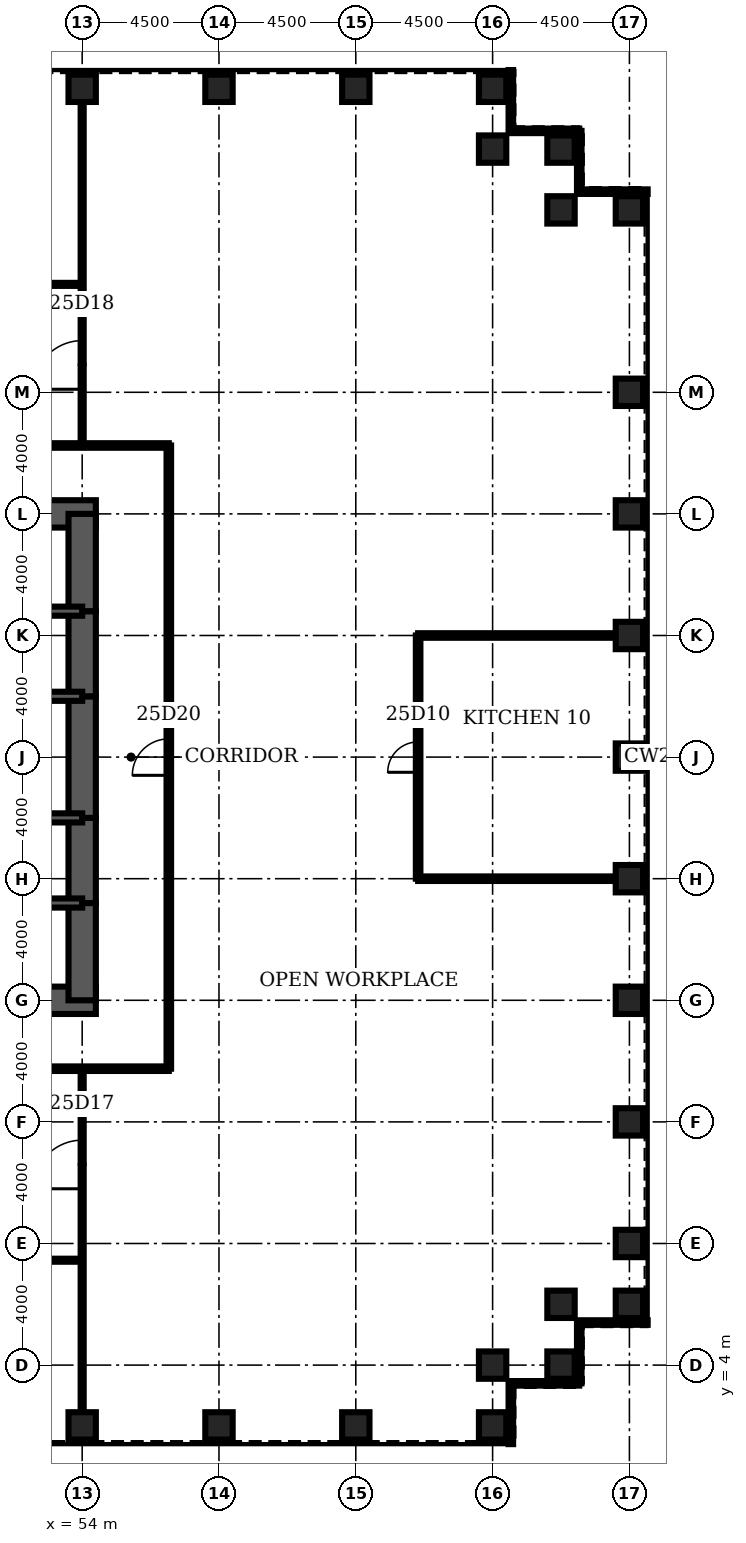
"""IFC4 building model, lengths in metres.
Left out: names, types, materials, properties, quantities, classifications, styles, units other than length and angle.
Written with IfcOpenShell. Run it as: python <this file> out.ifc"""

import sys

from ifc_helpers import new_model, si_unit, direction, frame, frame_2d, origin, origin_2d, place, context, subcontext, project, spatial, rectangle, hollow_rectangle, extrude, element, fill, save


model = new_model("IFC4")
c1 = context("Model", 3, precision=1e-05, world=origin(), true_north=direction((0.0, 1.0)))
c2 = subcontext(c1, "Body", "Model", "MODEL_VIEW")
j1 = project(units=[si_unit("LENGTHUNIT", "METRE"), si_unit("PLANEANGLEUNIT", "RADIAN")], contexts=[c1])
p1 = place(None, origin())
s1 = spatial("IfcSite", under=j1, at=p1, CompositionType="ELEMENT")
p2 = place(p1, origin())
s2 = spatial("IfcBuilding", under=s1, at=p2, CompositionType="ELEMENT")
p3 = place(p2, frame((0.0, 0.0, 117.3)))
s3 = spatial("IfcBuildingStorey", under=s2, at=p3, CompositionType="ELEMENT", Elevation=117.3)
for number, where, z_axis, x_axis in (
    (1, (54.0, 2.0, 0.0), (0.0, 0.0, 1.0), (0.0, 1.0, 0.0)),
    (2, (58.5, 2.0, 0.0), (0.0, 0.0, 1.0), (0.0, 1.0, 0.0)),
    (3, (63.0, 2.0, 0.0), (0.0, 0.0, 1.0), (0.0, 1.0, 0.0)),
    (4, (67.5, 2.0, 0.0), (0.0, 0.0, 1.0), (0.0, 1.0, 0.0)),
    (5, (67.5, 4.0, 0.0), (0.0, 0.0, 1.0), (0.0, 1.0, 0.0)),
    (6, (69.75, 4.0, 0.0), (0.0, 0.0, 1.0), (1.0, 0.0, 0.0)),
    (7, (69.75, 6.0, 0.0), (0.0, 0.0, 1.0), (1.0, 0.0, 0.0)),
    (8, (72.0, 6.0, 0.0), (0.0, 0.0, 1.0), (1.0, 0.0, 0.0)),
    (9, (72.0, 8.0, 0.0), (0.0, 0.0, 1.0), (1.0, 0.0, 0.0)),
    (10, (72.0, 12.0, 0.0), (0.0, 0.0, 1.0), (1.0, 0.0, 0.0)),
    (11, (72.0, 16.0, 0.0), (0.0, 0.0, 1.0), (1.0, 0.0, 0.0)),
    (12, (72.0, 20.0, 0.0), (0.0, 0.0, 1.0), (1.0, 0.0, 0.0)),
    (13, (72.0, 24.0, 0.0), (0.0, 0.0, 1.0), (1.0, 0.0, 0.0)),
    (14, (72.0, 28.0, 0.0), (0.0, 0.0, 1.0), (1.0, 0.0, 0.0)),
    (15, (72.0, 32.0, 0.0), (0.0, 0.0, 1.0), (1.0, 0.0, 0.0)),
    (16, (72.0, 36.0, 0.0), (0.0, 0.0, 1.0), (1.0, 0.0, 0.0)),
    (17, (72.0, 42.0, 0.0), (0.0, 0.0, 1.0), (1.0, 0.0, 0.0)),
    (18, (69.75, 42.0, 0.0), (0.0, 0.0, 1.0), (1.0, 0.0, 0.0)),
    (19, (69.75, 44.0, 0.0), (0.0, 0.0, 1.0), (1.0, 0.0, 0.0)),
    (20, (67.5, 44.0, 0.0), (0.0, 0.0, 1.0), (0.0, 1.0, 0.0)),
    (21, (67.5, 46.0, 0.0), (0.0, 0.0, 1.0), (0.0, 1.0, 0.0)),
    (22, (63.0, 46.0, 0.0), (0.0, 0.0, 1.0), (0.0, 1.0, 0.0)),
    (23, (58.5, 46.0, 0.0), (0.0, 0.0, 1.0), (0.0, 1.0, 0.0)),
    (24, (54.0, 46.0, 0.0), (0.0, 0.0, 1.0), (0.0, 1.0, 0.0)),
):
    element("IfcColumn", number, at=place(p3, frame(where, z_axis=z_axis, x_axis=x_axis)), inside=s3, PredefinedType="COLUMN", context=c2, shape_type="SweptSolid", body=[
        extrude(hollow_rectangle(XDim=0.9, YDim=0.9, WallThickness=0.11, at=origin_2d()), origin(), (0.0, 0.0, 1.0), 4.2),
    ])
for number, where, z_axis, x_axis in (
    (25, (45.0, 16.0, 0.0), (0.0, 0.0, 1.0), (1.0, 0.0, 0.0)),
    (26, (54.45, 32.0, 0.0), (0.0, 0.0, 1.0), (-1.0, 0.0, 0.0)),
):
    element("IfcWall", number, at=place(p3, frame(where, z_axis=z_axis, x_axis=x_axis)), inside=s3, PredefinedType="SHEAR", context=c2, shape_type="SweptSolid", body=[
        extrude(rectangle(XDim=9.45, YDim=0.9, at=frame_2d((4.725, 0.0))), origin(), (0.0, 0.0, 1.0), 4.2),
    ])
p4 = place(p3, frame((54.0, 16.0, 0.0), z_axis=(0.0, 0.0, 1.0), x_axis=(0.0, 1.0, 0.0)))
e27 = element("IfcWall", 27, at=p4, inside=s3, PredefinedType="SHEAR", context=c2, shape_type="SweptSolid", body=[
    extrude(rectangle(XDim=3.2, YDim=0.9, at=frame_2d((1.6, 0.0))), origin(), (0.0, 0.0, 1.0), 4.2),
])
p5 = place(p3, frame((54.0, 19.2, 0.0), z_axis=(0.0, 0.0, 1.0), x_axis=(0.0, 1.0, 0.0)))
e28 = element("IfcWall", 28, at=p5, inside=s3, PredefinedType="SHEAR", context=c2, shape_type="SweptSolid", body=[
    extrude(rectangle(XDim=2.8, YDim=0.9, at=frame_2d((1.4, 0.0))), origin(), (0.0, 0.0, 1.0), 4.2),
])
p6 = place(p5, frame((0.4, 0.0, 0.0)))
e29 = element("IfcOpeningElement", 29, at=p6, cuts=e28, PredefinedType="OPENING", context=c2, shape_type="SweptSolid", body=[
    extrude(rectangle(XDim=1.8, YDim=2.1, at=frame_2d((0.9, 1.05))), frame((0.0, 0.46, 0.0), z_axis=(0.0, -1.0, 0.0), x_axis=(1.0, 0.0, 0.0)), (0.0, 0.0, 1.0), 0.92),
])
p7 = place(p3, frame((54.0, 22.0, 0.0), z_axis=(0.0, 0.0, 1.0), x_axis=(0.0, 1.0, 0.0)))
e30 = element("IfcWall", 30, at=p7, inside=s3, PredefinedType="SHEAR", context=c2, shape_type="SweptSolid", body=[
    extrude(rectangle(XDim=4.0, YDim=0.9, at=frame_2d((2.0, 0.0))), origin(), (0.0, 0.0, 1.0), 4.2),
])
p8 = place(p3, frame((54.0, 26.0, 0.0), z_axis=(0.0, 0.0, 1.0), x_axis=(0.0, 1.0, 0.0)))
e31 = element("IfcWall", 31, at=p8, inside=s3, PredefinedType="SHEAR", context=c2, shape_type="SweptSolid", body=[
    extrude(rectangle(XDim=2.8, YDim=0.9, at=frame_2d((1.4, 0.0))), origin(), (0.0, 0.0, 1.0), 4.2),
])
p9 = place(p8, frame((0.6, 0.0, 0.0)))
e32 = element("IfcOpeningElement", 32, at=p9, cuts=e31, PredefinedType="OPENING", context=c2, shape_type="SweptSolid", body=[
    extrude(rectangle(XDim=1.8, YDim=2.1, at=frame_2d((0.9, 1.05))), frame((0.0, 0.46, 0.0), z_axis=(0.0, -1.0, 0.0), x_axis=(1.0, 0.0, 0.0)), (0.0, 0.0, 1.0), 0.92),
])
p10 = place(p3, frame((54.0, 28.8, 0.0), z_axis=(0.0, 0.0, 1.0), x_axis=(0.0, 1.0, 0.0)))
e33 = element("IfcWall", 33, at=p10, inside=s3, PredefinedType="SHEAR", context=c2, shape_type="SweptSolid", body=[
    extrude(rectangle(XDim=3.2, YDim=0.9, at=frame_2d((1.6, 0.0))), origin(), (0.0, 0.0, 1.0), 4.2),
])
p11 = place(p3, frame((45.0, 19.2, 0.0), z_axis=(0.0, 0.0, 1.0), x_axis=(1.0, 0.0, 0.0)))
e34 = element("IfcWall", 34, at=p11, inside=s3, PredefinedType="SOLIDWALL", context=c2, shape_type="SweptSolid", body=[
    extrude(rectangle(XDim=9.0, YDim=0.3, at=frame_2d((4.5, 0.0))), origin(), (0.0, 0.0, 1.0), 4.2),
])
p12 = place(p11, frame((7.35, 0.0, 0.0)))
e35 = element("IfcOpeningElement", 35, at=p12, cuts=e34, PredefinedType="OPENING", context=c2, shape_type="SweptSolid", body=[
    extrude(rectangle(XDim=1.0, YDim=2.1, at=frame_2d((0.5, 1.05))), frame((0.0, 0.16, 0.0), z_axis=(0.0, -1.0, 0.0), x_axis=(1.0, 0.0, 0.0)), (0.0, 0.0, 1.0), 0.32),
])
p13 = place(p3, frame((45.0, 28.8, 0.0), z_axis=(0.0, 0.0, 1.0), x_axis=(1.0, 0.0, 0.0)))
e36 = element("IfcWall", 36, at=p13, inside=s3, PredefinedType="SOLIDWALL", context=c2, shape_type="SweptSolid", body=[
    extrude(rectangle(XDim=9.0, YDim=0.3, at=frame_2d((4.5, 0.0))), origin(), (0.0, 0.0, 1.0), 4.2),
])
p14 = place(p13, frame((7.35, 0.0, 0.0)))
e37 = element("IfcOpeningElement", 37, at=p14, cuts=e36, PredefinedType="OPENING", context=c2, shape_type="SweptSolid", body=[
    extrude(rectangle(XDim=1.0, YDim=2.1, at=frame_2d((0.5, 1.05))), frame((0.0, 0.16, 0.0), z_axis=(0.0, -1.0, 0.0), x_axis=(1.0, 0.0, 0.0)), (0.0, 0.0, 1.0), 0.32),
])
p15 = place(p3, frame((48.0, 22.0, 0.0), z_axis=(0.0, 0.0, 1.0), x_axis=(1.0, 0.0, 0.0)))
e38 = element("IfcWall", 38, at=p15, inside=s3, PredefinedType="SOLIDWALL", context=c2, shape_type="SweptSolid", body=[
    extrude(rectangle(XDim=6.0, YDim=0.3, at=frame_2d((3.0, 0.0))), origin(), (0.0, 0.0, 1.0), 4.2),
])
p16 = place(p15, frame((2.0, 0.0, 0.0)))
e39 = element("IfcOpeningElement", 39, at=p16, cuts=e38, PredefinedType="OPENING", context=c2, shape_type="SweptSolid", body=[
    extrude(rectangle(XDim=1.0, YDim=2.1, at=frame_2d((0.5, 1.05))), frame((0.0, 0.16, 0.0), z_axis=(0.0, -1.0, 0.0), x_axis=(1.0, 0.0, 0.0)), (0.0, 0.0, 1.0), 0.32),
])
p17 = place(p15, frame((4.0, 0.0, 0.0)))
e40 = element("IfcOpeningElement", 40, at=p17, cuts=e38, PredefinedType="OPENING", context=c2, shape_type="SweptSolid", body=[
    extrude(rectangle(XDim=1.0, YDim=2.1, at=frame_2d((0.5, 1.05))), frame((0.0, 0.16, 0.0), z_axis=(0.0, -1.0, 0.0), x_axis=(1.0, 0.0, 0.0)), (0.0, 0.0, 1.0), 0.32),
])
p18 = place(p3, frame((48.0, 26.0, 0.0), z_axis=(0.0, 0.0, 1.0), x_axis=(1.0, 0.0, 0.0)))
e41 = element("IfcWall", 41, at=p18, inside=s3, PredefinedType="SOLIDWALL", context=c2, shape_type="SweptSolid", body=[
    extrude(rectangle(XDim=6.0, YDim=0.3, at=frame_2d((3.0, 0.0))), origin(), (0.0, 0.0, 1.0), 4.2),
])
p19 = place(p3, frame((36.0, 7.45, 0.0), z_axis=(0.0, 0.0, 1.0), x_axis=(1.0, 0.0, 0.0)))
e42 = element("IfcWall", 42, at=p19, inside=s3, PredefinedType="PARTITIONING", context=c2, shape_type="SweptSolid", body=[
    extrude(rectangle(XDim=18.0, YDim=0.1, at=frame_2d((9.0, 0.0))), origin(), (0.0, 0.0, 1.0), 3.0),
])
p20 = place(p19, frame((4.0, 0.0, 0.0)))
e43 = element("IfcOpeningElement", 43, at=p20, cuts=e42, PredefinedType="OPENING", context=c2, shape_type="SweptSolid", body=[
    extrude(rectangle(XDim=1.0, YDim=2.1, at=frame_2d((0.5, 1.05))), frame((0.0, 0.06, 0.0), z_axis=(0.0, -1.0, 0.0), x_axis=(1.0, 0.0, 0.0)), (0.0, 0.0, 1.0), 0.12),
])
p21 = place(p19, frame((13.0, 0.0, 0.0)))
e44 = element("IfcOpeningElement", 44, at=p21, cuts=e42, PredefinedType="OPENING", context=c2, shape_type="SweptSolid", body=[
    extrude(rectangle(XDim=1.0, YDim=2.1, at=frame_2d((0.5, 1.05))), frame((0.0, 0.06, 0.0), z_axis=(0.0, -1.0, 0.0), x_axis=(1.0, 0.0, 0.0)), (0.0, 0.0, 1.0), 0.12),
])
p22 = place(p3, frame((15.15, 13.75, 0.0), z_axis=(0.0, 0.0, 1.0), x_axis=(1.0, 0.0, 0.0)))
e45 = element("IfcWall", 45, at=p22, inside=s3, PredefinedType="PARTITIONING", context=c2, shape_type="SweptSolid", body=[
    extrude(rectangle(XDim=41.7, YDim=0.15, at=frame_2d((20.85, 0.0))), origin(), (0.0, 0.0, 1.0), 3.0),
])
p23 = place(p22, frame((29.275, 0.0, 0.0)))
e46 = element("IfcOpeningElement", 46, at=p23, cuts=e45, PredefinedType="OPENING", context=c2, shape_type="SweptSolid", body=[
    extrude(rectangle(XDim=1.2, YDim=2.1, at=frame_2d((0.6, 1.05))), frame((0.0, 0.085, 0.0), z_axis=(0.0, -1.0, 0.0), x_axis=(1.0, 0.0, 0.0)), (0.0, 0.0, 1.0), 0.17),
])
for number, where, z_axis, x_axis in (
    (47, (65.05, 20.0, 0.0), (0.0, 0.0, 1.0), (1.0, 0.0, 0.0)),
    (48, (65.05, 28.0, 0.0), (0.0, 0.0, 1.0), (1.0, 0.0, 0.0)),
):
    element("IfcWall", number, at=place(p3, frame(where, z_axis=z_axis, x_axis=x_axis)), inside=s3, PredefinedType="PARTITIONING", context=c2, shape_type="SweptSolid", body=[
        extrude(rectangle(XDim=6.5, YDim=0.15, at=frame_2d((3.25, 0.0))), origin(), (0.0, 0.0, 1.0), 3.0),
    ])
p24 = place(p3, frame((15.15, 34.25, 0.0), z_axis=(0.0, 0.0, 1.0), x_axis=(1.0, 0.0, 0.0)))
e49 = element("IfcWall", 49, at=p24, inside=s3, PredefinedType="PARTITIONING", context=c2, shape_type="SweptSolid", body=[
    extrude(rectangle(XDim=41.7, YDim=0.15, at=frame_2d((20.85, 0.0))), origin(), (0.0, 0.0, 1.0), 3.0),
])
p25 = place(p24, frame((20.25, 0.0, 0.0)))
e50 = element("IfcOpeningElement", 50, at=p25, cuts=e49, PredefinedType="OPENING", context=c2, shape_type="SweptSolid", body=[
    extrude(rectangle(XDim=1.2, YDim=2.1, at=frame_2d((0.6, 1.05))), frame((0.0, 0.085, 0.0), z_axis=(0.0, -1.0, 0.0), x_axis=(1.0, 0.0, 0.0)), (0.0, 0.0, 1.0), 0.17),
])
p26 = place(p3, frame((18.0, 39.55, 0.0), z_axis=(0.0, 0.0, 1.0), x_axis=(1.0, 0.0, 0.0)))
e51 = element("IfcWall", 51, at=p26, inside=s3, PredefinedType="PARTITIONING", context=c2, shape_type="SweptSolid", body=[
    extrude(rectangle(XDim=36.0, YDim=0.1, at=frame_2d((18.0, 0.0))), origin(), (0.0, 0.0, 1.0), 3.0),
])
p27 = place(p26, frame((4.0, 0.0, 0.0)))
e52 = element("IfcOpeningElement", 52, at=p27, cuts=e51, PredefinedType="OPENING", context=c2, shape_type="SweptSolid", body=[
    extrude(rectangle(XDim=1.0, YDim=2.1, at=frame_2d((0.5, 1.05))), frame((0.0, 0.06, 0.0), z_axis=(0.0, -1.0, 0.0), x_axis=(1.0, 0.0, 0.0)), (0.0, 0.0, 1.0), 0.12),
])
p28 = place(p26, frame((13.0, 0.0, 0.0)))
e53 = element("IfcOpeningElement", 53, at=p28, cuts=e51, PredefinedType="OPENING", context=c2, shape_type="SweptSolid", body=[
    extrude(rectangle(XDim=1.0, YDim=2.1, at=frame_2d((0.5, 1.05))), frame((0.0, 0.06, 0.0), z_axis=(0.0, -1.0, 0.0), x_axis=(1.0, 0.0, 0.0)), (0.0, 0.0, 1.0), 0.12),
])
p29 = place(p26, frame((22.0, 0.0, 0.0)))
e54 = element("IfcOpeningElement", 54, at=p29, cuts=e51, PredefinedType="OPENING", context=c2, shape_type="SweptSolid", body=[
    extrude(rectangle(XDim=1.0, YDim=2.1, at=frame_2d((0.5, 1.05))), frame((0.0, 0.06, 0.0), z_axis=(0.0, -1.0, 0.0), x_axis=(1.0, 0.0, 0.0)), (0.0, 0.0, 1.0), 0.12),
])
p30 = place(p26, frame((31.0, 0.0, 0.0)))
e55 = element("IfcOpeningElement", 55, at=p30, cuts=e51, PredefinedType="OPENING", context=c2, shape_type="SweptSolid", body=[
    extrude(rectangle(XDim=1.0, YDim=2.1, at=frame_2d((0.5, 1.05))), frame((0.0, 0.06, 0.0), z_axis=(0.0, -1.0, 0.0), x_axis=(1.0, 0.0, 0.0)), (0.0, 0.0, 1.0), 0.12),
])
p31 = place(p3, frame((54.0, 2.45, 0.0), z_axis=(0.0, 0.0, 1.0), x_axis=(0.0, 1.0, 0.0)))
e56 = element("IfcWall", 56, at=p31, inside=s3, PredefinedType="PARTITIONING", context=c2, shape_type="SweptSolid", body=[
    extrude(rectangle(XDim=11.3, YDim=0.1, at=frame_2d((5.65, 0.0))), origin(), (0.0, 0.0, 1.0), 3.0),
])
p32 = place(p31, frame((7.35, 0.0, 0.0)))
e57 = element("IfcOpeningElement", 57, at=p32, cuts=e56, PredefinedType="OPENING", context=c2, shape_type="SweptSolid", body=[
    extrude(rectangle(XDim=1.6, YDim=2.1, at=frame_2d((0.8, 1.05))), frame((0.0, 0.06, 0.0), z_axis=(0.0, -1.0, 0.0), x_axis=(1.0, 0.0, 0.0)), (0.0, 0.0, 1.0), 0.12),
])
p33 = place(p3, frame((54.0, 34.25, 0.0), z_axis=(0.0, 0.0, 1.0), x_axis=(0.0, 1.0, 0.0)))
e58 = element("IfcWall", 58, at=p33, inside=s3, PredefinedType="PARTITIONING", context=c2, shape_type="SweptSolid", body=[
    extrude(rectangle(XDim=11.3, YDim=0.1, at=frame_2d((5.65, 0.0))), origin(), (0.0, 0.0, 1.0), 3.0),
])
p34 = place(p33, frame((1.85, 0.0, 0.0)))
e59 = element("IfcOpeningElement", 59, at=p34, cuts=e58, PredefinedType="OPENING", context=c2, shape_type="SweptSolid", body=[
    extrude(rectangle(XDim=1.6, YDim=2.1, at=frame_2d((0.8, 1.05))), frame((0.0, 0.06, 0.0), z_axis=(0.0, -1.0, 0.0), x_axis=(1.0, 0.0, 0.0)), (0.0, 0.0, 1.0), 0.12),
])
p35 = place(p3, frame((56.85, 13.75, 0.0), z_axis=(0.0, 0.0, 1.0), x_axis=(0.0, 1.0, 0.0)))
e60 = element("IfcWall", 60, at=p35, inside=s3, PredefinedType="PARTITIONING", context=c2, shape_type="SweptSolid", body=[
    extrude(rectangle(XDim=20.5, YDim=0.15, at=frame_2d((10.25, 0.0))), origin(), (0.0, 0.0, 1.0), 3.0),
])
p36 = place(p35, frame((9.65, 0.0, 0.0)))
e61 = element("IfcOpeningElement", 61, at=p36, cuts=e60, PredefinedType="OPENING", context=c2, shape_type="SweptSolid", body=[
    extrude(rectangle(XDim=1.2, YDim=2.1, at=frame_2d((0.6, 1.05))), frame((0.0, 0.085, 0.0), z_axis=(0.0, -1.0, 0.0), x_axis=(1.0, 0.0, 0.0)), (0.0, 0.0, 1.0), 0.17),
])
p37 = place(p3, frame((65.05, 20.0, 0.0), z_axis=(0.0, 0.0, 1.0), x_axis=(0.0, 1.0, 0.0)))
e62 = element("IfcWall", 62, at=p37, inside=s3, PredefinedType="PARTITIONING", context=c2, shape_type="SweptSolid", body=[
    extrude(rectangle(XDim=8.0, YDim=0.15, at=frame_2d((4.0, 0.0))), origin(), (0.0, 0.0, 1.0), 3.0),
])
p38 = place(p37, frame((3.5, 0.0, 0.0)))
e63 = element("IfcOpeningElement", 63, at=p38, cuts=e62, PredefinedType="OPENING", context=c2, shape_type="SweptSolid", body=[
    extrude(rectangle(XDim=1.0, YDim=2.1, at=frame_2d((0.5, 1.05))), frame((0.0, 0.085, 0.0), z_axis=(0.0, -1.0, 0.0), x_axis=(1.0, 0.0, 0.0)), (0.0, 0.0, 1.0), 0.17),
])
p39 = place(p3, frame((68.1, 1.4, 0.0), z_axis=(0.0, 0.0, 1.0), x_axis=(0.0, 1.0, 0.0)))
e64 = element("IfcWall", 64, at=p39, inside=s3, PredefinedType="ELEMENTEDWALL", context=c2, shape_type="SweptSolid", body=[
    extrude(rectangle(XDim=2.0, YDim=0.15, at=frame_2d((1.0, 0.0))), origin(), (0.0, 0.0, 1.0), 4.04),
])
p40 = place(p3, frame((68.1, 3.4, 0.0), z_axis=(0.0, 0.0, 1.0), x_axis=(1.0, 0.0, 0.0)))
e65 = element("IfcWall", 65, at=p40, inside=s3, PredefinedType="ELEMENTEDWALL", context=c2, shape_type="SweptSolid", body=[
    extrude(rectangle(XDim=2.25, YDim=0.15, at=frame_2d((1.125, 0.0))), origin(), (0.0, 0.0, 1.0), 4.04),
])
p41 = place(p3, frame((70.35, 3.4, 0.0), z_axis=(0.0, 0.0, 1.0), x_axis=(0.0, 1.0, 0.0)))
e66 = element("IfcWall", 66, at=p41, inside=s3, PredefinedType="ELEMENTEDWALL", context=c2, shape_type="SweptSolid", body=[
    extrude(rectangle(XDim=2.0, YDim=0.15, at=frame_2d((1.0, 0.0))), origin(), (0.0, 0.0, 1.0), 4.04),
])
for number, where, z_axis, x_axis in (
    (67, (70.35, 5.4, 0.0), (0.0, 0.0, 1.0), (1.0, 0.0, 0.0)),
    (68, (72.6, 42.6, 0.0), (0.0, 0.0, 1.0), (-1.0, 0.0, 0.0)),
):
    element("IfcWall", number, at=place(p3, frame(where, z_axis=z_axis, x_axis=x_axis)), inside=s3, PredefinedType="ELEMENTEDWALL", context=c2, shape_type="SweptSolid", body=[
        extrude(rectangle(XDim=2.25, YDim=0.15, at=frame_2d((1.125, 0.0))), origin(), (0.0, 0.0, 1.0), 4.04),
    ])
p42 = place(p3, frame((70.35, 42.6, 0.0), z_axis=(0.0, 0.0, 1.0), x_axis=(0.0, 1.0, 0.0)))
e69 = element("IfcWall", 69, at=p42, inside=s3, PredefinedType="ELEMENTEDWALL", context=c2, shape_type="SweptSolid", body=[
    extrude(rectangle(XDim=2.0, YDim=0.15, at=frame_2d((1.0, 0.0))), origin(), (0.0, 0.0, 1.0), 4.04),
])
p43 = place(p3, frame((70.35, 44.6, 0.0), z_axis=(0.0, 0.0, 1.0), x_axis=(-1.0, 0.0, 0.0)))
e70 = element("IfcWall", 70, at=p43, inside=s3, PredefinedType="ELEMENTEDWALL", context=c2, shape_type="SweptSolid", body=[
    extrude(rectangle(XDim=2.25, YDim=0.15, at=frame_2d((1.125, 0.0))), origin(), (0.0, 0.0, 1.0), 4.04),
])
p44 = place(p3, frame((68.1, 44.6, 0.0), z_axis=(0.0, 0.0, 1.0), x_axis=(0.0, 1.0, 0.0)))
e71 = element("IfcWall", 71, at=p44, inside=s3, PredefinedType="ELEMENTEDWALL", context=c2, shape_type="SweptSolid", body=[
    extrude(rectangle(XDim=2.0, YDim=0.15, at=frame_2d((1.0, 0.0))), origin(), (0.0, 0.0, 1.0), 4.04),
])
p45 = place(p38, origin())
e72 = element("IfcDoor", 72, at=p45, inside=s3, OperationType="SINGLE_SWING_LEFT", PredefinedType="DOOR", context=c2, shape_type="SweptSolid", body=[
    extrude(rectangle(XDim=1.0, YDim=2.1, at=frame_2d((0.5, 1.05))), frame((0.0, 0.025, 0.0), z_axis=(0.0, -1.0, 0.0), x_axis=(1.0, 0.0, 0.0)), (0.0, 0.0, 1.0), 0.05),
])
fill(e63, e72)
p46 = place(p32, origin())
e73 = element("IfcDoor", 73, at=p46, inside=s3, OperationType="SINGLE_SWING_LEFT", PredefinedType="DOOR", context=c2, shape_type="SweptSolid", body=[
    extrude(rectangle(XDim=1.6, YDim=2.1, at=frame_2d((0.8, 1.05))), frame((0.0, 0.025, 0.0), z_axis=(0.0, -1.0, 0.0), x_axis=(1.0, 0.0, 0.0)), (0.0, 0.0, 1.0), 0.05),
])
fill(e57, e73)
p47 = place(p34, origin())
e74 = element("IfcDoor", 74, at=p47, inside=s3, OperationType="SINGLE_SWING_LEFT", PredefinedType="DOOR", context=c2, shape_type="SweptSolid", body=[
    extrude(rectangle(XDim=1.6, YDim=2.1, at=frame_2d((0.8, 1.05))), frame((0.0, 0.025, 0.0), z_axis=(0.0, -1.0, 0.0), x_axis=(1.0, 0.0, 0.0)), (0.0, 0.0, 1.0), 0.05),
])
fill(e59, e74)
p48 = place(p36, origin())
e75 = element("IfcDoor", 75, at=p48, inside=s3, OperationType="SINGLE_SWING_LEFT", PredefinedType="DOOR", context=c2, shape_type="SweptSolid", body=[
    extrude(rectangle(XDim=1.2, YDim=2.1, at=frame_2d((0.6, 1.05))), frame((0.0, 0.025, 0.0), z_axis=(0.0, -1.0, 0.0), x_axis=(1.0, 0.0, 0.0)), (0.0, 0.0, 1.0), 0.05),
])
fill(e61, e75)
p49 = place(p12, origin())
e76 = element("IfcDoor", 76, at=p49, inside=s3, OperationType="SINGLE_SWING_RIGHT", PredefinedType="DOOR", context=c2, shape_type="SweptSolid", body=[
    extrude(rectangle(XDim=1.0, YDim=2.1, at=frame_2d((0.5, 1.05))), frame((0.0, 0.025, 0.0), z_axis=(0.0, -1.0, 0.0), x_axis=(1.0, 0.0, 0.0)), (0.0, 0.0, 1.0), 0.05),
])
fill(e35, e76)
p50 = place(p14, origin())
e77 = element("IfcDoor", 77, at=p50, inside=s3, OperationType="SINGLE_SWING_RIGHT", PredefinedType="DOOR", context=c2, shape_type="SweptSolid", body=[
    extrude(rectangle(XDim=1.0, YDim=2.1, at=frame_2d((0.5, 1.05))), frame((0.0, 0.025, 0.0), z_axis=(0.0, -1.0, 0.0), x_axis=(1.0, 0.0, 0.0)), (0.0, 0.0, 1.0), 0.05),
])
fill(e37, e77)
p51 = place(p6, origin())
e78 = element("IfcDoor", 78, at=p51, inside=s3, OperationType="SINGLE_SWING_LEFT", PredefinedType="DOOR", context=c2, shape_type="SweptSolid", body=[
    extrude(rectangle(XDim=1.8, YDim=2.1, at=frame_2d((0.9, 1.05))), frame((0.0, 0.45, 0.0), z_axis=(0.0, -1.0, 0.0), x_axis=(1.0, 0.0, 0.0)), (0.0, 0.0, 1.0), 0.899),
])
fill(e29, e78)
p52 = place(p9, origin())
e79 = element("IfcDoor", 79, at=p52, inside=s3, OperationType="SINGLE_SWING_LEFT", PredefinedType="DOOR", context=c2, shape_type="SweptSolid", body=[
    extrude(rectangle(XDim=1.8, YDim=2.1, at=frame_2d((0.9, 1.05))), frame((0.0, 0.45, 0.0), z_axis=(0.0, -1.0, 0.0), x_axis=(1.0, 0.0, 0.0)), (0.0, 0.0, 1.0), 0.899),
])
fill(e32, e79)
save(model, sys.argv[1])
